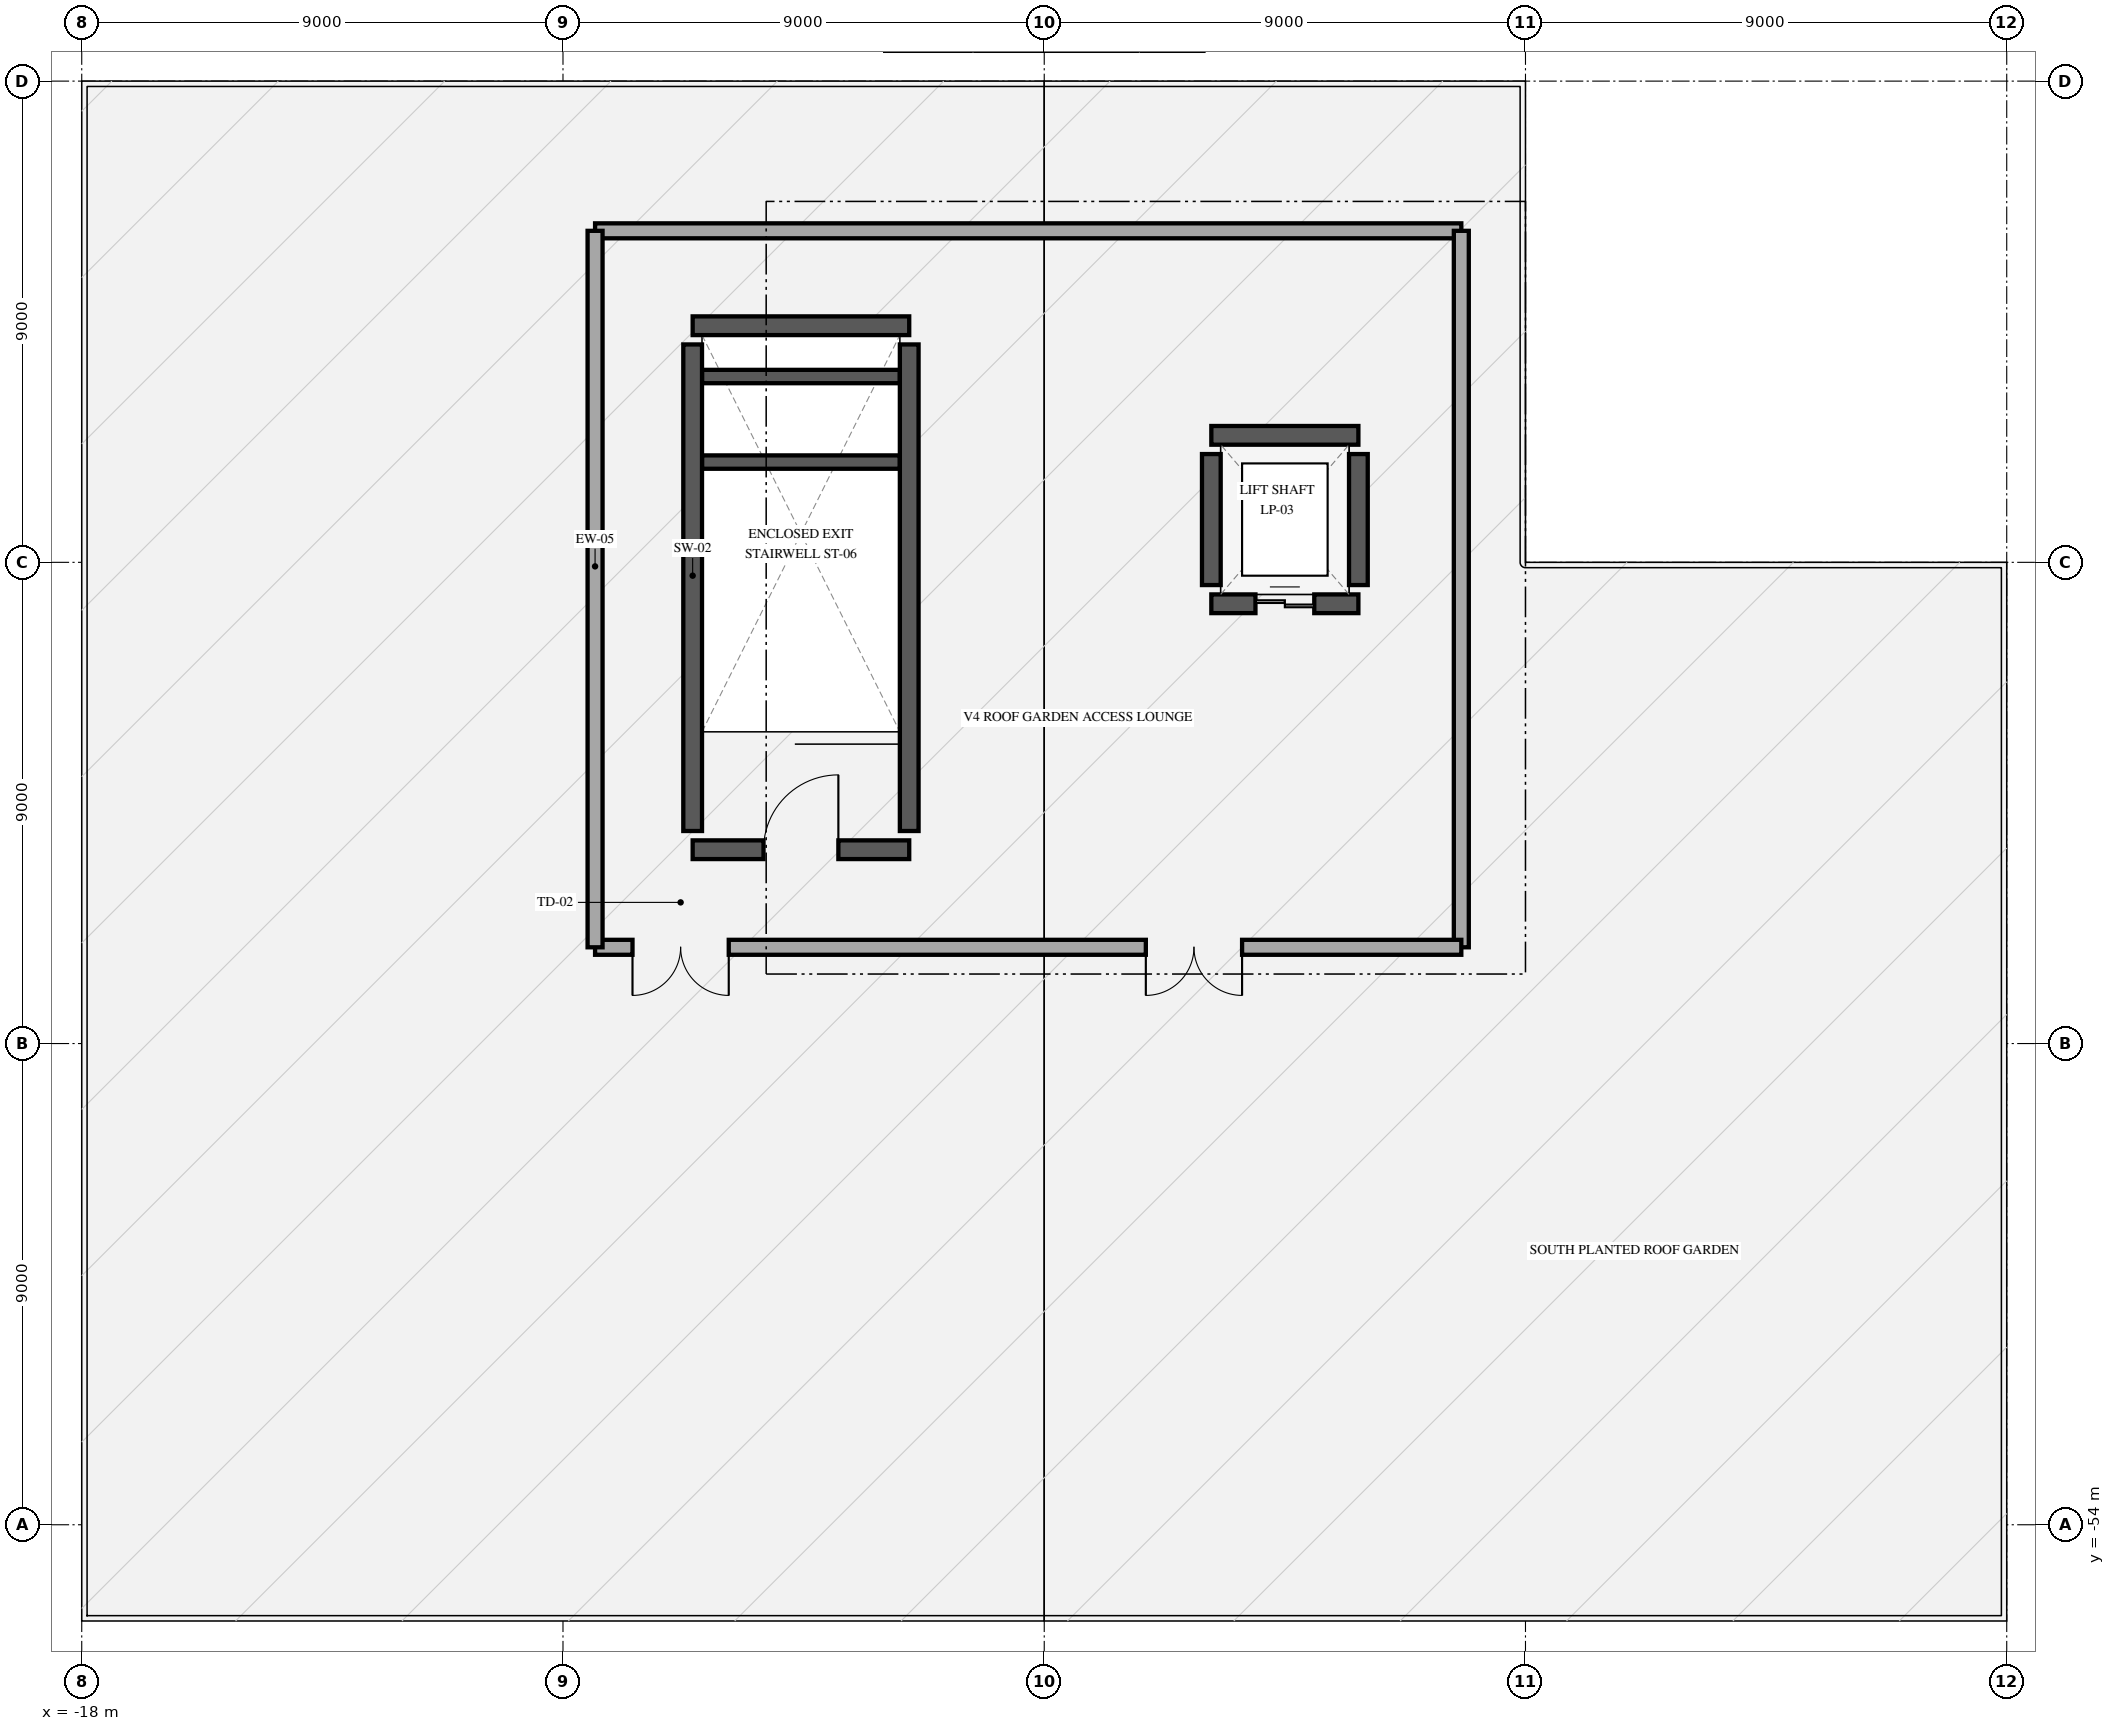
"""IFC4 building model, lengths in metres.
Left out: names, types, materials, properties, quantities, classifications, styles, units other than length and angle.
Written with IfcOpenShell. Run it as: python <this file> out.ifc"""

import sys

from ifc_helpers import new_model, si_unit, direction, frame, frame_2d, origin, place, context, subcontext, project, spatial, rectangle, extrude, element, fill, save


model = new_model("IFC4")
c1 = context("Model", 3, precision=1e-05, world=origin(), true_north=direction((0.0, 1.0)))
c2 = subcontext(c1, "Body", "Model", "MODEL_VIEW")
j1 = project(units=[si_unit("LENGTHUNIT", "METRE"), si_unit("PLANEANGLEUNIT", "RADIAN")], contexts=[c1])
p1 = place(None, origin())
s1 = spatial("IfcSite", under=j1, at=p1, CompositionType="ELEMENT")
p2 = place(p1, origin())
s2 = spatial("IfcBuilding", under=s1, at=p2, CompositionType="ELEMENT")
p3 = place(p2, frame((0.0, 0.0, 16.2)))
s3 = spatial("IfcBuildingStorey", under=s2, at=p3, CompositionType="ELEMENT", Elevation=16.2)
p4 = place(p3, frame((-8.4, -29.8, 0.0), z_axis=(0.0, 0.0, 1.0), x_axis=(1.0, 0.0, 0.0)))
e1 = element("IfcWall", 1, at=p4, inside=s3, PredefinedType="SOLIDWALL", context=c2, shape_type="SweptSolid", body=[
    extrude(rectangle(XDim=16.2, YDim=0.28, at=frame_2d((8.1, 0.0))), origin(), (0.0, 0.0, 1.0), 5.25),
])
p5 = place(p3, frame((7.8, -29.8, 0.0), z_axis=(0.0, 0.0, 1.0), x_axis=(0.0, -1.0, 0.0)))
e2 = element("IfcWall", 2, at=p5, inside=s3, PredefinedType="SOLIDWALL", context=c2, shape_type="SweptSolid", body=[
    extrude(rectangle(XDim=13.4, YDim=0.28, at=frame_2d((6.7, 0.0))), origin(), (0.0, 0.0, 1.0), 5.25),
])
p6 = place(p3, frame((7.8, -43.2, 0.0), z_axis=(0.0, 0.0, 1.0), x_axis=(-1.0, 0.0, 0.0)))
e3 = element("IfcWall", 3, at=p6, inside=s3, PredefinedType="SOLIDWALL", context=c2, shape_type="SweptSolid", body=[
    extrude(rectangle(XDim=16.2, YDim=0.28, at=frame_2d((8.1, 0.0))), origin(), (0.0, 0.0, 1.0), 5.25),
])
p7 = place(p6, frame((4.1, 0.0, 0.0)))
e4 = element("IfcOpeningElement", 4, at=p7, cuts=e3, PredefinedType="OPENING", context=c2, shape_type="SweptSolid", body=[
    extrude(rectangle(XDim=1.8, YDim=2.4, at=frame_2d((0.9, 1.2))), frame((0.0, 0.15, 0.0), z_axis=(0.0, -1.0, 0.0), x_axis=(1.0, 0.0, 0.0)), (0.0, 0.0, 1.0), 0.3),
])
p8 = place(p6, frame((13.7, 0.0, 0.0)))
e5 = element("IfcOpeningElement", 5, at=p8, cuts=e3, PredefinedType="OPENING", context=c2, shape_type="SweptSolid", body=[
    extrude(rectangle(XDim=1.8, YDim=2.4, at=frame_2d((0.9, 1.2))), frame((0.0, 0.15, 0.0), z_axis=(0.0, -1.0, 0.0), x_axis=(1.0, 0.0, 0.0)), (0.0, 0.0, 1.0), 0.3),
])
p9 = place(p3, frame((-8.4, -43.2, 0.0), z_axis=(0.0, 0.0, 1.0), x_axis=(0.0, 1.0, 0.0)))
e6 = element("IfcWall", 6, at=p9, inside=s3, PredefinedType="SOLIDWALL", context=c2, shape_type="SweptSolid", body=[
    extrude(rectangle(XDim=13.4, YDim=0.28, at=frame_2d((6.7, 0.0))), origin(), (0.0, 0.0, 1.0), 5.25),
])
for number, where, z_axis, x_axis in (
    (7, (-6.4, -34.125, 0.0), (0.0, 0.0, 1.0), (1.0, 0.0, 0.0)),
    (8, (-6.4, -32.525, 0.0), (0.0, 0.0, 1.0), (1.0, 0.0, 0.0)),
):
    element("IfcWall", number, at=place(p3, frame(where, z_axis=z_axis, x_axis=x_axis)), inside=s3, PredefinedType="SHEAR", context=c2, shape_type="SweptSolid", body=[
        extrude(rectangle(XDim=3.7, YDim=0.25, at=frame_2d((1.85, 0.0))), origin(), (0.0, 0.0, 1.0), 2.5),
    ])
p10 = place(p3, frame((-6.575, -41.375, 0.0), z_axis=(0.0, 0.0, 1.0), x_axis=(1.0, 0.0, 0.0)))
e9 = element("IfcWall", 9, at=p10, inside=s3, PredefinedType="SHEAR", context=c2, shape_type="SweptSolid", body=[
    extrude(rectangle(XDim=4.05, YDim=0.35, at=frame_2d((2.025, 0.0))), origin(), (0.0, 0.0, 1.0), 5.25),
])
p11 = place(p10, frame((1.325, 0.0, 0.0)))
e10 = element("IfcOpeningElement", 10, at=p11, cuts=e9, PredefinedType="OPENING", context=c2, shape_type="SweptSolid", body=[
    extrude(rectangle(XDim=1.4, YDim=2.2, at=frame_2d((0.7, 1.1))), frame((0.0, 0.185, 0.0), z_axis=(0.0, -1.0, 0.0), x_axis=(1.0, 0.0, 0.0)), (0.0, 0.0, 1.0), 0.37),
])
p12 = place(p3, frame((-6.575, -31.575, 0.0), z_axis=(0.0, 0.0, 1.0), x_axis=(1.0, 0.0, 0.0)))
e11 = element("IfcWall", 11, at=p12, inside=s3, PredefinedType="SHEAR", context=c2, shape_type="SweptSolid", body=[
    extrude(rectangle(XDim=4.05, YDim=0.35, at=frame_2d((2.025, 0.0))), origin(), (0.0, 0.0, 1.0), 5.25),
])
for number, where, z_axis, x_axis in (
    (12, (-6.575, -41.025, 0.0), (0.0, 0.0, 1.0), (0.0, 1.0, 0.0)),
    (13, (-2.525, -41.025, 0.0), (0.0, 0.0, 1.0), (0.0, 1.0, 0.0)),
):
    element("IfcWall", number, at=place(p3, frame(where, z_axis=z_axis, x_axis=x_axis)), inside=s3, PredefinedType="SHEAR", context=c2, shape_type="SweptSolid", body=[
        extrude(rectangle(XDim=9.1, YDim=0.35, at=frame_2d((4.55, 0.0))), origin(), (0.0, 0.0, 1.0), 5.25),
    ])
p13 = place(p3, frame((3.125, -36.775, 0.0), z_axis=(0.0, 0.0, 1.0), x_axis=(1.0, 0.0, 0.0)))
e14 = element("IfcWall", 14, at=p13, inside=s3, PredefinedType="SHEAR", context=c2, shape_type="SweptSolid", body=[
    extrude(rectangle(XDim=2.75, YDim=0.35, at=frame_2d((1.375, 0.0))), origin(), (0.0, 0.0, 1.0), 5.25),
])
p14 = place(p13, frame((0.825, 0.0, 0.0)))
e15 = element("IfcOpeningElement", 15, at=p14, cuts=e14, PredefinedType="OPENING", context=c2, shape_type="SweptSolid", body=[
    extrude(rectangle(XDim=1.1, YDim=2.2, at=frame_2d((0.55, 1.1))), frame((0.0, 0.185, 0.0), z_axis=(0.0, -1.0, 0.0), x_axis=(1.0, 0.0, 0.0)), (0.0, 0.0, 1.0), 0.37),
])
p15 = place(p3, frame((5.875, -33.625, 0.0), z_axis=(0.0, 0.0, 1.0), x_axis=(-1.0, 0.0, 0.0)))
e16 = element("IfcWall", 16, at=p15, inside=s3, PredefinedType="SHEAR", context=c2, shape_type="SweptSolid", body=[
    extrude(rectangle(XDim=2.75, YDim=0.35, at=frame_2d((1.375, 0.0))), origin(), (0.0, 0.0, 1.0), 5.25),
])
for number, where, z_axis, x_axis in (
    (17, (3.125, -36.425, 0.0), (0.0, 0.0, 1.0), (0.0, 1.0, 0.0)),
    (18, (5.875, -36.425, 0.0), (0.0, 0.0, 1.0), (0.0, 1.0, 0.0)),
):
    element("IfcWall", number, at=place(p3, frame(where, z_axis=z_axis, x_axis=x_axis)), inside=s3, PredefinedType="SHEAR", context=c2, shape_type="SweptSolid", body=[
        extrude(rectangle(XDim=2.45, YDim=0.35, at=frame_2d((1.225, 0.0))), origin(), (0.0, 0.0, 1.0), 5.25),
    ])
p16 = place(p7, origin())
e19 = element("IfcDoor", 19, at=p16, inside=s3, OperationType="DOUBLE_DOOR_SINGLE_SWING", PredefinedType="DOOR", context=c2, shape_type="SweptSolid", body=[
    extrude(rectangle(XDim=1.8, YDim=2.4, at=frame_2d((0.9, 1.2))), frame((0.0, 0.025, 0.0), z_axis=(0.0, -1.0, 0.0), x_axis=(1.0, 0.0, 0.0)), (0.0, 0.0, 1.0), 0.05),
])
fill(e4, e19)
p17 = place(p8, origin())
e20 = element("IfcDoor", 20, at=p17, inside=s3, OperationType="DOUBLE_DOOR_SINGLE_SWING", PredefinedType="DOOR", context=c2, shape_type="SweptSolid", body=[
    extrude(rectangle(XDim=1.8, YDim=2.4, at=frame_2d((0.9, 1.2))), frame((0.0, 0.025, 0.0), z_axis=(0.0, -1.0, 0.0), x_axis=(1.0, 0.0, 0.0)), (0.0, 0.0, 1.0), 0.05),
])
fill(e5, e20)
p18 = place(p11, origin())
e21 = element("IfcDoor", 21, at=p18, inside=s3, OperationType="SINGLE_SWING_RIGHT", PredefinedType="DOOR", context=c2, shape_type="SweptSolid", body=[
    extrude(rectangle(XDim=1.4, YDim=2.2, at=frame_2d((0.7, 1.1))), frame((0.0, 0.025, 0.0), z_axis=(0.0, -1.0, 0.0), x_axis=(1.0, 0.0, 0.0)), (0.0, 0.0, 1.0), 0.05),
])
fill(e10, e21)
p19 = place(p14, origin())
e22 = element("IfcDoor", 22, at=p19, inside=s3, OperationType="DOUBLE_DOOR_SLIDING", PredefinedType="DOOR", context=c2, shape_type="SweptSolid", body=[
    extrude(rectangle(XDim=1.1, YDim=2.2, at=frame_2d((0.55, 1.1))), frame((0.0, 0.025, 0.0), z_axis=(0.0, -1.0, 0.0), x_axis=(1.0, 0.0, 0.0)), (0.0, 0.0, 1.0), 0.05),
])
fill(e15, e22)
save(model, sys.argv[1])
